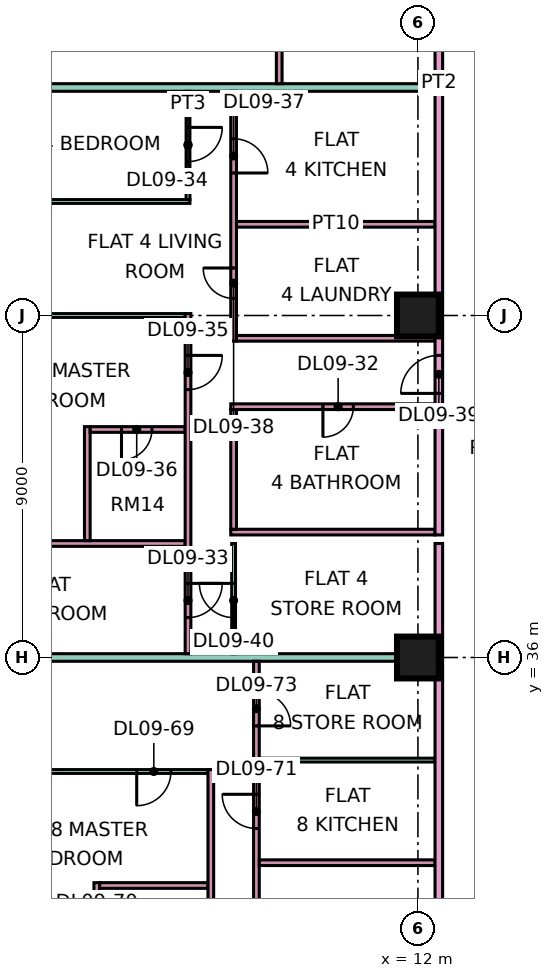
"""IFC4 building model, lengths in metres.
Left out: names, types, materials, properties, quantities, classifications, styles, units other than length and angle.
Written with IfcOpenShell. Run it as: python <this file> out.ifc"""

import sys

from ifc_helpers import new_model, si_unit, direction, frame, frame_2d, origin, origin_2d, place, context, subcontext, project, spatial, rectangle, extrude, element, fill, save


model = new_model("IFC4")
c1 = context("Model", 3, precision=1e-05, world=origin(), true_north=direction((0.0, 1.0)))
c2 = subcontext(c1, "Body", "Model", "MODEL_VIEW")
j1 = project(units=[si_unit("LENGTHUNIT", "METRE"), si_unit("PLANEANGLEUNIT", "RADIAN")], contexts=[c1])
p1 = place(None, origin())
s1 = spatial("IfcSite", under=j1, at=p1, CompositionType="ELEMENT")
p2 = place(p1, origin())
s2 = spatial("IfcBuilding", under=s1, at=p2, CompositionType="ELEMENT")
p3 = place(p2, frame((0.0, 0.0, 48.9)))
s3 = spatial("IfcBuildingStorey", under=s2, at=p3, CompositionType="ELEMENT", Elevation=48.9)
for number, where, z_axis, x_axis in (
    (1, (12.0, 36.0, 0.0), (0.0, 0.0, 1.0), (1.0, 0.0, 0.0)),
    (2, (12.0, 45.0, 0.0), (0.0, 0.0, 1.0), (1.0, 0.0, 0.0)),
):
    element("IfcColumn", number, at=place(p3, frame(where, z_axis=z_axis, x_axis=x_axis)), inside=s3, PredefinedType="COLUMN", context=c2, shape_type="SweptSolid", body=[
        extrude(rectangle(XDim=1.1, YDim=1.1, at=origin_2d()), origin(), (0.0, 0.0, 1.0), 3.75),
    ])
p4 = place(p3, frame((-1.351, 39.0, 0.0), z_axis=(0.0, 0.0, 1.0), x_axis=(1.0, 0.0, 0.0)))
e3 = element("IfcWall", 3, at=p4, inside=s3, PredefinedType="PARTITIONING", context=c2, shape_type="SweptSolid", body=[
    extrude(rectangle(XDim=7.226, YDim=0.15, at=frame_2d((3.613, 0.0))), origin(), (0.0, 0.0, 1.0), 3.35),
])
p5 = place(p3, frame((0.0, 36.0, 0.0), z_axis=(0.0, 0.0, 1.0), x_axis=(1.0, 0.0, 0.0)))
e4 = element("IfcWall", 4, at=p5, inside=s3, PredefinedType="PARTITIONING", context=c2, shape_type="SweptSolid", body=[
    extrude(rectangle(XDim=12.45, YDim=0.2, at=frame_2d((6.225, 0.0))), origin(), (0.0, 0.0, 1.0), 3.35),
])
p6 = place(p3, frame((0.0, 45.0, 0.0), z_axis=(0.0, 0.0, 1.0), x_axis=(1.0, 0.0, 0.0)))
e5 = element("IfcWall", 5, at=p6, inside=s3, PredefinedType="PARTITIONING", context=c2, shape_type="SweptSolid", body=[
    extrude(rectangle(XDim=5.875, YDim=0.1, at=frame_2d((2.938, 0.0))), origin(), (0.0, 0.0, 1.0), 3.35),
])
p7 = place(p3, frame((0.0, 48.0, 0.0), z_axis=(0.0, 0.0, 1.0), x_axis=(1.0, 0.0, 0.0)))
e6 = element("IfcWall", 6, at=p7, inside=s3, PredefinedType="PARTITIONING", context=c2, shape_type="SweptSolid", body=[
    extrude(rectangle(XDim=6.0, YDim=0.1, at=frame_2d((3.0, 0.0))), origin(), (0.0, 0.0, 1.0), 3.35),
])
p8 = place(p3, frame((0.074, 33.0, 0.0), z_axis=(0.0, 0.0, 1.0), x_axis=(1.0, 0.0, 0.0)))
e7 = element("IfcWall", 7, at=p8, inside=s3, PredefinedType="PARTITIONING", context=c2, shape_type="SweptSolid", body=[
    extrude(rectangle(XDim=6.401, YDim=0.1, at=frame_2d((3.201, 0.0))), origin(), (0.0, 0.0, 1.0), 3.35),
])
p9 = place(p8, frame((4.526, 0.0, 0.0)))
e8 = element("IfcOpeningElement", 8, at=p9, cuts=e7, PredefinedType="OPENING", context=c2, shape_type="SweptSolid", body=[
    extrude(rectangle(XDim=0.9, YDim=2.1, at=frame_2d((0.45, 1.05))), frame((0.0, 0.06, 0.0), z_axis=(0.0, -1.0, 0.0), x_axis=(1.0, 0.0, 0.0)), (0.0, 0.0, 1.0), 0.12),
])
p10 = place(p3, frame((0.074, 51.0, 0.0), z_axis=(0.0, 0.0, 1.0), x_axis=(1.0, 0.0, 0.0)))
e9 = element("IfcWall", 9, at=p10, inside=s3, PredefinedType="PARTITIONING", context=c2, shape_type="SweptSolid", body=[
    extrude(rectangle(XDim=12.376, YDim=0.2, at=frame_2d((6.188, 0.0))), origin(), (0.0, 0.0, 1.0), 3.35),
])
p11 = place(p3, frame((3.3, 39.075, 0.0), z_axis=(0.0, 0.0, 1.0), x_axis=(0.0, 1.0, 0.0)))
e10 = element("IfcWall", 10, at=p11, inside=s3, PredefinedType="PARTITIONING", context=c2, shape_type="SweptSolid", body=[
    extrude(rectangle(XDim=3.0, YDim=0.15, at=frame_2d((1.5, 0.0))), origin(), (0.0, 0.0, 1.0), 3.35),
])
p12 = place(p3, frame((3.375, 42.0, 0.0), z_axis=(0.0, 0.0, 1.0), x_axis=(1.0, 0.0, 0.0)))
e11 = element("IfcWall", 11, at=p12, inside=s3, PredefinedType="PARTITIONING", context=c2, shape_type="SweptSolid", body=[
    extrude(rectangle(XDim=2.5, YDim=0.15, at=frame_2d((1.25, 0.0))), origin(), (0.0, 0.0, 1.0), 3.35),
])
p13 = place(p12, frame((0.825, 0.0, 0.0)))
e12 = element("IfcOpeningElement", 12, at=p13, cuts=e11, PredefinedType="OPENING", context=c2, shape_type="SweptSolid", body=[
    extrude(rectangle(XDim=0.8, YDim=2.1, at=frame_2d((0.4, 1.05))), frame((0.0, 0.085, 0.0), z_axis=(0.0, -1.0, 0.0), x_axis=(1.0, 0.0, 0.0)), (0.0, 0.0, 1.0), 0.17),
])
p14 = place(p3, frame((3.55, 27.075, 0.0), z_axis=(0.0, 0.0, 1.0), x_axis=(0.0, 1.0, 0.0)))
e13 = element("IfcWall", 13, at=p14, inside=s3, PredefinedType="PARTITIONING", context=c2, shape_type="SweptSolid", body=[
    extrude(rectangle(XDim=3.0, YDim=0.15, at=frame_2d((1.5, 0.0))), origin(), (0.0, 0.0, 1.0), 3.35),
])
p15 = place(p14, frame((0.975, 0.0, 0.0)))
e14 = element("IfcOpeningElement", 14, at=p15, cuts=e13, PredefinedType="OPENING", context=c2, shape_type="SweptSolid", body=[
    extrude(rectangle(XDim=0.8, YDim=2.1, at=frame_2d((0.4, 1.05))), frame((0.0, 0.085, 0.0), z_axis=(0.0, -1.0, 0.0), x_axis=(1.0, 0.0, 0.0)), (0.0, 0.0, 1.0), 0.17),
])
p16 = place(p3, frame((3.625, 30.0, 0.0), z_axis=(0.0, 0.0, 1.0), x_axis=(1.0, 0.0, 0.0)))
e15 = element("IfcWall", 15, at=p16, inside=s3, PredefinedType="PARTITIONING", context=c2, shape_type="SweptSolid", body=[
    extrude(rectangle(XDim=2.85, YDim=0.15, at=frame_2d((1.425, 0.0))), origin(), (0.0, 0.0, 1.0), 3.35),
])
p17 = place(p3, frame((5.95, 36.1, 0.0), z_axis=(0.0, 0.0, 1.0), x_axis=(0.0, 1.0, 0.0)))
e16 = element("IfcWall", 16, at=p17, inside=s3, PredefinedType="PARTITIONING", context=c2, shape_type="SweptSolid", body=[
    extrude(rectangle(XDim=8.95, YDim=0.15, at=frame_2d((4.475, 0.0))), origin(), (0.0, 0.0, 1.0), 3.35),
])
p18 = place(p17, frame((0.95, 0.0, 0.0)))
e17 = element("IfcOpeningElement", 17, at=p18, cuts=e16, PredefinedType="OPENING", context=c2, shape_type="SweptSolid", body=[
    extrude(rectangle(XDim=0.9, YDim=2.1, at=frame_2d((0.45, 1.05))), frame((0.0, 0.085, 0.0), z_axis=(0.0, -1.0, 0.0), x_axis=(1.0, 0.0, 0.0)), (0.0, 0.0, 1.0), 0.17),
])
p19 = place(p17, frame((6.95, 0.0, 0.0)))
e18 = element("IfcOpeningElement", 18, at=p19, cuts=e16, PredefinedType="OPENING", context=c2, shape_type="SweptSolid", body=[
    extrude(rectangle(XDim=0.9, YDim=2.1, at=frame_2d((0.45, 1.05))), frame((0.0, 0.085, 0.0), z_axis=(0.0, -1.0, 0.0), x_axis=(1.0, 0.0, 0.0)), (0.0, 0.0, 1.0), 0.17),
])
p20 = place(p3, frame((5.95, 48.05, 0.0), z_axis=(0.0, 0.0, 1.0), x_axis=(0.0, 1.0, 0.0)))
e19 = element("IfcWall", 19, at=p20, inside=s3, PredefinedType="PARTITIONING", context=c2, shape_type="SweptSolid", body=[
    extrude(rectangle(XDim=2.85, YDim=0.1, at=frame_2d((1.425, 0.0))), origin(), (0.0, 0.0, 1.0), 3.35),
])
p21 = place(p20, frame((1.0, 0.0, 0.0)))
e20 = element("IfcOpeningElement", 20, at=p21, cuts=e19, PredefinedType="OPENING", context=c2, shape_type="SweptSolid", body=[
    extrude(rectangle(XDim=0.9, YDim=2.1, at=frame_2d((0.45, 1.05))), frame((0.0, 0.06, 0.0), z_axis=(0.0, -1.0, 0.0), x_axis=(1.0, 0.0, 0.0)), (0.0, 0.0, 1.0), 0.12),
])
p22 = place(p3, frame((6.55, 22.5, 0.0), z_axis=(0.0, 0.0, 1.0), x_axis=(0.0, 1.0, 0.0)))
e21 = element("IfcWall", 21, at=p22, inside=s3, PredefinedType="PARTITIONING", context=c2, shape_type="SweptSolid", body=[
    extrude(rectangle(XDim=10.55, YDim=0.15, at=frame_2d((5.275, 0.0))), origin(), (0.0, 0.0, 1.0), 3.35),
])
p23 = place(p22, frame((1.8, 0.0, 0.0)))
e22 = element("IfcOpeningElement", 22, at=p23, cuts=e21, PredefinedType="OPENING", context=c2, shape_type="SweptSolid", body=[
    extrude(rectangle(XDim=0.9, YDim=2.1, at=frame_2d((0.45, 1.05))), frame((0.0, 0.085, 0.0), z_axis=(0.0, -1.0, 0.0), x_axis=(1.0, 0.0, 0.0)), (0.0, 0.0, 1.0), 0.17),
])
p24 = place(p3, frame((7.075, 39.3, 0.0), z_axis=(0.0, 0.0, 1.0), x_axis=(1.0, 0.0, 0.0)))
e23 = element("IfcWall", 23, at=p24, inside=s3, PredefinedType="PARTITIONING", context=c2, shape_type="SweptSolid", body=[
    extrude(rectangle(XDim=5.375, YDim=0.15, at=frame_2d((2.688, 0.0))), origin(), (0.0, 0.0, 1.0), 3.35),
])
p25 = place(p3, frame((7.075, 42.6, 0.0), z_axis=(0.0, 0.0, 1.0), x_axis=(1.0, 0.0, 0.0)))
e24 = element("IfcWall", 24, at=p25, inside=s3, PredefinedType="PARTITIONING", context=c2, shape_type="SweptSolid", body=[
    extrude(rectangle(XDim=5.375, YDim=0.15, at=frame_2d((2.688, 0.0))), origin(), (0.0, 0.0, 1.0), 3.35),
])
p26 = place(p25, frame((2.425, 0.0, 0.0)))
e25 = element("IfcOpeningElement", 25, at=p26, cuts=e24, PredefinedType="OPENING", context=c2, shape_type="SweptSolid", body=[
    extrude(rectangle(XDim=0.8, YDim=2.1, at=frame_2d((0.4, 1.05))), frame((0.0, 0.085, 0.0), z_axis=(0.0, -1.0, 0.0), x_axis=(1.0, 0.0, 0.0)), (0.0, 0.0, 1.0), 0.17),
])
p27 = place(p3, frame((7.15, 36.1, 0.0), z_axis=(0.0, 0.0, 1.0), x_axis=(0.0, 1.0, 0.0)))
e26 = element("IfcWall", 26, at=p27, inside=s3, PredefinedType="PARTITIONING", context=c2, shape_type="SweptSolid", body=[
    extrude(rectangle(XDim=2.9, YDim=0.1, at=frame_2d((1.45, 0.0))), origin(), (0.0, 0.0, 1.0), 3.35),
])
p28 = place(p27, frame((0.95, 0.0, 0.0)))
e27 = element("IfcOpeningElement", 27, at=p28, cuts=e26, PredefinedType="OPENING", context=c2, shape_type="SweptSolid", body=[
    extrude(rectangle(XDim=0.9, YDim=2.1, at=frame_2d((0.45, 1.05))), frame((0.0, 0.06, 0.0), z_axis=(0.0, -1.0, 0.0), x_axis=(1.0, 0.0, 0.0)), (0.0, 0.0, 1.0), 0.12),
])
p29 = place(p3, frame((7.15, 39.375, 0.0), z_axis=(0.0, 0.0, 1.0), x_axis=(0.0, 1.0, 0.0)))
e28 = element("IfcWall", 28, at=p29, inside=s3, PredefinedType="PARTITIONING", context=c2, shape_type="SweptSolid", body=[
    extrude(rectangle(XDim=3.15, YDim=0.15, at=frame_2d((1.575, 0.0))), origin(), (0.0, 0.0, 1.0), 3.35),
])
p30 = place(p3, frame((7.15, 44.325, 0.0), z_axis=(0.0, 0.0, 1.0), x_axis=(0.0, 1.0, 0.0)))
e29 = element("IfcWall", 29, at=p30, inside=s3, PredefinedType="PARTITIONING", context=c2, shape_type="SweptSolid", body=[
    extrude(rectangle(XDim=6.575, YDim=0.15, at=frame_2d((3.288, 0.0))), origin(), (0.0, 0.0, 1.0), 3.35),
])
p31 = place(p30, frame((4.425, 0.0, 0.0)))
e30 = element("IfcOpeningElement", 30, at=p31, cuts=e29, PredefinedType="OPENING", context=c2, shape_type="SweptSolid", body=[
    extrude(rectangle(XDim=0.9, YDim=2.1, at=frame_2d((0.45, 1.05))), frame((0.0, 0.085, 0.0), z_axis=(0.0, -1.0, 0.0), x_axis=(1.0, 0.0, 0.0)), (0.0, 0.0, 1.0), 0.17),
])
p32 = place(p30, frame((1.125, 0.0, 0.0)))
e31 = element("IfcOpeningElement", 31, at=p32, cuts=e29, PredefinedType="OPENING", context=c2, shape_type="SweptSolid", body=[
    extrude(rectangle(XDim=0.8, YDim=2.1, at=frame_2d((0.4, 1.05))), frame((0.0, 0.085, 0.0), z_axis=(0.0, -1.0, 0.0), x_axis=(1.0, 0.0, 0.0)), (0.0, 0.0, 1.0), 0.17),
])
for number, where, z_axis, x_axis in (
    (32, (7.225, 44.4, 0.0), (0.0, 0.0, 1.0), (1.0, 0.0, 0.0)),
    (33, (7.225, 47.4, 0.0), (0.0, 0.0, 1.0), (1.0, 0.0, 0.0)),
):
    element("IfcWall", number, at=place(p3, frame(where, z_axis=z_axis, x_axis=x_axis)), inside=s3, PredefinedType="PARTITIONING", context=c2, shape_type="SweptSolid", body=[
        extrude(rectangle(XDim=5.225, YDim=0.15, at=frame_2d((2.612, 0.0))), origin(), (0.0, 0.0, 1.0), 3.35),
    ])
p33 = place(p3, frame((7.75, 26.625, 0.0), z_axis=(0.0, 0.0, 1.0), x_axis=(0.0, 1.0, 0.0)))
e34 = element("IfcWall", 34, at=p33, inside=s3, PredefinedType="PARTITIONING", context=c2, shape_type="SweptSolid", body=[
    extrude(rectangle(XDim=9.275, YDim=0.15, at=frame_2d((4.637, 0.0))), origin(), (0.0, 0.0, 1.0), 3.35),
])
p34 = place(p33, frame((4.875, 0.0, 0.0)))
e35 = element("IfcOpeningElement", 35, at=p34, cuts=e34, PredefinedType="OPENING", context=c2, shape_type="SweptSolid", body=[
    extrude(rectangle(XDim=0.9, YDim=2.1, at=frame_2d((0.45, 1.05))), frame((0.0, 0.085, 0.0), z_axis=(0.0, -1.0, 0.0), x_axis=(1.0, 0.0, 0.0)), (0.0, 0.0, 1.0), 0.17),
])
p35 = place(p33, frame((7.575, 0.0, 0.0)))
e36 = element("IfcOpeningElement", 36, at=p35, cuts=e34, PredefinedType="OPENING", context=c2, shape_type="SweptSolid", body=[
    extrude(rectangle(XDim=0.9, YDim=2.1, at=frame_2d((0.45, 1.05))), frame((0.0, 0.085, 0.0), z_axis=(0.0, -1.0, 0.0), x_axis=(1.0, 0.0, 0.0)), (0.0, 0.0, 1.0), 0.17),
])
p36 = place(p3, frame((7.825, 30.6, 0.0), z_axis=(0.0, 0.0, 1.0), x_axis=(1.0, 0.0, 0.0)))
e37 = element("IfcWall", 37, at=p36, inside=s3, PredefinedType="PARTITIONING", context=c2, shape_type="SweptSolid", body=[
    extrude(rectangle(XDim=4.625, YDim=0.15, at=frame_2d((2.312, 0.0))), origin(), (0.0, 0.0, 1.0), 3.35),
])
p37 = place(p3, frame((7.825, 33.3, 0.0), z_axis=(0.0, 0.0, 1.0), x_axis=(1.0, 0.0, 0.0)))
e38 = element("IfcWall", 38, at=p37, inside=s3, PredefinedType="PARTITIONING", context=c2, shape_type="SweptSolid", body=[
    extrude(rectangle(XDim=4.625, YDim=0.1, at=frame_2d((2.312, 0.0))), origin(), (0.0, 0.0, 1.0), 3.35),
])
p38 = place(p3, frame((8.35, 51.1, 0.0), z_axis=(0.0, 0.0, 1.0), x_axis=(0.0, 1.0, 0.0)))
e39 = element("IfcWall", 39, at=p38, inside=s3, PredefinedType="PARTITIONING", context=c2, shape_type="SweptSolid", body=[
    extrude(rectangle(XDim=8.975, YDim=0.15, at=frame_2d((4.487, 0.0))), origin(), (0.0, 0.0, 1.0), 3.35),
])
p39 = place(p38, frame((6.95, 0.0, 0.0)))
e40 = element("IfcOpeningElement", 40, at=p39, cuts=e39, PredefinedType="OPENING", context=c2, shape_type="SweptSolid", body=[
    extrude(rectangle(XDim=0.8, YDim=2.1, at=frame_2d((0.4, 1.05))), frame((0.0, 0.085, 0.0), z_axis=(0.0, -1.0, 0.0), x_axis=(1.0, 0.0, 0.0)), (0.0, 0.0, 1.0), 0.17),
])
p40 = place(p38, frame((2.45, 0.0, 0.0)))
e41 = element("IfcOpeningElement", 41, at=p40, cuts=e39, PredefinedType="OPENING", context=c2, shape_type="SweptSolid", body=[
    extrude(rectangle(XDim=0.9, YDim=2.1, at=frame_2d((0.45, 1.05))), frame((0.0, 0.085, 0.0), z_axis=(0.0, -1.0, 0.0), x_axis=(1.0, 0.0, 0.0)), (0.0, 0.0, 1.0), 0.17),
])
p41 = place(p3, frame((12.55, 20.0, 0.0), z_axis=(0.0, 0.0, 1.0), x_axis=(0.0, 1.0, 0.0)))
e42 = element("IfcWall", 42, at=p41, inside=s3, PredefinedType="PARTITIONING", context=c2, shape_type="SweptSolid", body=[
    extrude(rectangle(XDim=19.0, YDim=0.2, at=frame_2d((9.5, 0.0))), origin(), (0.0, 0.0, 1.0), 3.35),
])
p42 = place(p41, frame((0.6, 0.0, 0.0)))
e43 = element("IfcOpeningElement", 43, at=p42, cuts=e42, PredefinedType="OPENING", context=c2, shape_type="SweptSolid", body=[
    extrude(rectangle(XDim=1.2, YDim=2.1, at=frame_2d((0.6, 1.05))), frame((0.0, 0.11, 0.0), z_axis=(0.0, -1.0, 0.0), x_axis=(1.0, 0.0, 0.0)), (0.0, 0.0, 1.0), 0.22),
])
p43 = place(p41, frame((4.65, 0.0, 0.0)))
e44 = element("IfcOpeningElement", 44, at=p43, cuts=e42, PredefinedType="OPENING", context=c2, shape_type="SweptSolid", body=[
    extrude(rectangle(XDim=1.0, YDim=2.1, at=frame_2d((0.5, 1.05))), frame((0.0, 0.11, 0.0), z_axis=(0.0, -1.0, 0.0), x_axis=(1.0, 0.0, 0.0)), (0.0, 0.0, 1.0), 0.22),
])
p44 = place(p3, frame((12.55, 39.225, 0.0), z_axis=(0.0, 0.0, 1.0), x_axis=(0.0, 1.0, 0.0)))
e45 = element("IfcWall", 45, at=p44, inside=s3, PredefinedType="PARTITIONING", context=c2, shape_type="SweptSolid", body=[
    extrude(rectangle(XDim=23.775, YDim=0.2, at=frame_2d((11.887, 0.0))), origin(), (0.0, 0.0, 1.0), 3.35),
])
p45 = place(p44, frame((3.725, 0.0, 0.0)))
e46 = element("IfcOpeningElement", 46, at=p45, cuts=e45, PredefinedType="OPENING", context=c2, shape_type="SweptSolid", body=[
    extrude(rectangle(XDim=1.0, YDim=2.1, at=frame_2d((0.5, 1.05))), frame((0.0, 0.11, 0.0), z_axis=(0.0, -1.0, 0.0), x_axis=(1.0, 0.0, 0.0)), (0.0, 0.0, 1.0), 0.22),
])
p46 = place(p44, frame((21.725, 0.0, 0.0)))
e47 = element("IfcOpeningElement", 47, at=p46, cuts=e45, PredefinedType="OPENING", context=c2, shape_type="SweptSolid", body=[
    extrude(rectangle(XDim=1.0, YDim=2.1, at=frame_2d((0.5, 1.05))), frame((0.0, 0.11, 0.0), z_axis=(0.0, -1.0, 0.0), x_axis=(1.0, 0.0, 0.0)), (0.0, 0.0, 1.0), 0.22),
])
p47 = place(p26, frame((0.8, 0.0, 0.0), z_axis=(0.0, 0.0, 1.0), x_axis=(-1.0, 0.0, 0.0)))
e48 = element("IfcDoor", 48, at=p47, inside=s3, OperationType="SINGLE_SWING_LEFT", PredefinedType="DOOR", context=c2, shape_type="SweptSolid", body=[
    extrude(rectangle(XDim=0.8, YDim=2.1, at=frame_2d((0.4, 1.05))), frame((0.0, 0.025, 0.0), z_axis=(0.0, -1.0, 0.0), x_axis=(1.0, 0.0, 0.0)), (0.0, 0.0, 1.0), 0.05),
])
fill(e25, e48)
p48 = place(p18, origin())
e49 = element("IfcDoor", 49, at=p48, inside=s3, OperationType="SINGLE_SWING_RIGHT", PredefinedType="DOOR", context=c2, shape_type="SweptSolid", body=[
    extrude(rectangle(XDim=0.9, YDim=2.1, at=frame_2d((0.45, 1.05))), frame((0.0, 0.025, 0.0), z_axis=(0.0, -1.0, 0.0), x_axis=(1.0, 0.0, 0.0)), (0.0, 0.0, 1.0), 0.05),
])
fill(e17, e49)
p49 = place(p21, origin())
e50 = element("IfcDoor", 50, at=p49, inside=s3, OperationType="SINGLE_SWING_RIGHT", PredefinedType="DOOR", context=c2, shape_type="SweptSolid", body=[
    extrude(rectangle(XDim=0.9, YDim=2.1, at=frame_2d((0.45, 1.05))), frame((0.0, 0.025, 0.0), z_axis=(0.0, -1.0, 0.0), x_axis=(1.0, 0.0, 0.0)), (0.0, 0.0, 1.0), 0.05),
])
fill(e20, e50)
p50 = place(p19, origin())
e51 = element("IfcDoor", 51, at=p50, inside=s3, OperationType="SINGLE_SWING_RIGHT", PredefinedType="DOOR", context=c2, shape_type="SweptSolid", body=[
    extrude(rectangle(XDim=0.9, YDim=2.1, at=frame_2d((0.45, 1.05))), frame((0.0, 0.025, 0.0), z_axis=(0.0, -1.0, 0.0), x_axis=(1.0, 0.0, 0.0)), (0.0, 0.0, 1.0), 0.05),
])
fill(e18, e51)
p51 = place(p13, frame((0.8, 0.0, 0.0), z_axis=(0.0, 0.0, 1.0), x_axis=(-1.0, 0.0, 0.0)))
e52 = element("IfcDoor", 52, at=p51, inside=s3, OperationType="SINGLE_SWING_LEFT", PredefinedType="DOOR", context=c2, shape_type="SweptSolid", body=[
    extrude(rectangle(XDim=0.8, YDim=2.1, at=frame_2d((0.4, 1.05))), frame((0.0, 0.025, 0.0), z_axis=(0.0, -1.0, 0.0), x_axis=(1.0, 0.0, 0.0)), (0.0, 0.0, 1.0), 0.05),
])
fill(e12, e52)
p52 = place(p31, frame((0.9, 0.0, 0.0), z_axis=(0.0, 0.0, 1.0), x_axis=(-1.0, 0.0, 0.0)))
e53 = element("IfcDoor", 53, at=p52, inside=s3, OperationType="SINGLE_SWING_LEFT", PredefinedType="DOOR", context=c2, shape_type="SweptSolid", body=[
    extrude(rectangle(XDim=0.9, YDim=2.1, at=frame_2d((0.45, 1.05))), frame((0.0, 0.025, 0.0), z_axis=(0.0, -1.0, 0.0), x_axis=(1.0, 0.0, 0.0)), (0.0, 0.0, 1.0), 0.05),
])
fill(e30, e53)
p53 = place(p32, frame((0.8, 0.0, 0.0), z_axis=(0.0, 0.0, 1.0), x_axis=(-1.0, 0.0, 0.0)))
e54 = element("IfcDoor", 54, at=p53, inside=s3, OperationType="SINGLE_SWING_RIGHT", PredefinedType="DOOR", context=c2, shape_type="SweptSolid", body=[
    extrude(rectangle(XDim=0.8, YDim=2.1, at=frame_2d((0.4, 1.05))), frame((0.0, 0.025, 0.0), z_axis=(0.0, -1.0, 0.0), x_axis=(1.0, 0.0, 0.0)), (0.0, 0.0, 1.0), 0.05),
])
fill(e31, e54)
p54 = place(p45, origin())
e55 = element("IfcDoor", 55, at=p54, inside=s3, OperationType="SINGLE_SWING_LEFT", PredefinedType="DOOR", context=c2, shape_type="SweptSolid", body=[
    extrude(rectangle(XDim=1.0, YDim=2.1, at=frame_2d((0.5, 1.05))), frame((0.0, 0.025, 0.0), z_axis=(0.0, -1.0, 0.0), x_axis=(1.0, 0.0, 0.0)), (0.0, 0.0, 1.0), 0.05),
])
fill(e46, e55)
p55 = place(p28, frame((0.9, 0.0, 0.0), z_axis=(0.0, 0.0, 1.0), x_axis=(-1.0, 0.0, 0.0)))
e56 = element("IfcDoor", 56, at=p55, inside=s3, OperationType="SINGLE_SWING_RIGHT", PredefinedType="DOOR", context=c2, shape_type="SweptSolid", body=[
    extrude(rectangle(XDim=0.9, YDim=2.1, at=frame_2d((0.45, 1.05))), frame((0.0, 0.025, 0.0), z_axis=(0.0, -1.0, 0.0), x_axis=(1.0, 0.0, 0.0)), (0.0, 0.0, 1.0), 0.05),
])
fill(e27, e56)
p56 = place(p9, frame((0.9, 0.0, 0.0), z_axis=(0.0, 0.0, 1.0), x_axis=(-1.0, 0.0, 0.0)))
e57 = element("IfcDoor", 57, at=p56, inside=s3, OperationType="SINGLE_SWING_LEFT", PredefinedType="DOOR", context=c2, shape_type="SweptSolid", body=[
    extrude(rectangle(XDim=0.9, YDim=2.1, at=frame_2d((0.45, 1.05))), frame((0.0, 0.025, 0.0), z_axis=(0.0, -1.0, 0.0), x_axis=(1.0, 0.0, 0.0)), (0.0, 0.0, 1.0), 0.05),
])
fill(e8, e57)
p57 = place(p34, frame((0.9, 0.0, 0.0), z_axis=(0.0, 0.0, 1.0), x_axis=(-1.0, 0.0, 0.0)))
e58 = element("IfcDoor", 58, at=p57, inside=s3, OperationType="SINGLE_SWING_RIGHT", PredefinedType="DOOR", context=c2, shape_type="SweptSolid", body=[
    extrude(rectangle(XDim=0.9, YDim=2.1, at=frame_2d((0.45, 1.05))), frame((0.0, 0.025, 0.0), z_axis=(0.0, -1.0, 0.0), x_axis=(1.0, 0.0, 0.0)), (0.0, 0.0, 1.0), 0.05),
])
fill(e35, e58)
p58 = place(p35, frame((0.9, 0.0, 0.0), z_axis=(0.0, 0.0, 1.0), x_axis=(-1.0, 0.0, 0.0)))
e59 = element("IfcDoor", 59, at=p58, inside=s3, OperationType="SINGLE_SWING_LEFT", PredefinedType="DOOR", context=c2, shape_type="SweptSolid", body=[
    extrude(rectangle(XDim=0.9, YDim=2.1, at=frame_2d((0.45, 1.05))), frame((0.0, 0.025, 0.0), z_axis=(0.0, -1.0, 0.0), x_axis=(1.0, 0.0, 0.0)), (0.0, 0.0, 1.0), 0.05),
])
fill(e36, e59)
save(model, sys.argv[1])
